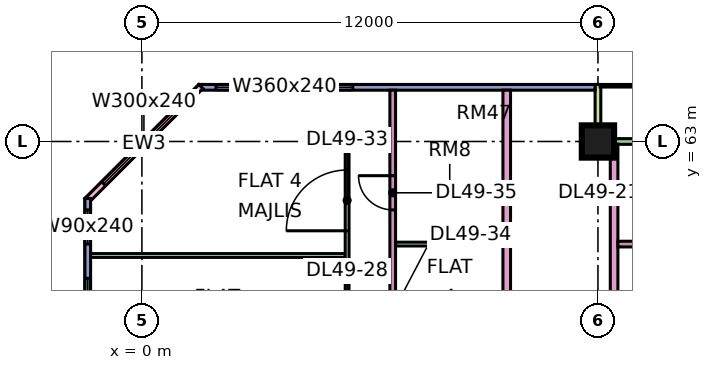
"""IFC4 building model, lengths in metres.
Left out: names, types, materials, properties, quantities, classifications, styles, units other than length and angle.
Written with IfcOpenShell. Run it as: python <this file> out.ifc"""

import sys

from ifc_helpers import new_model, si_unit, direction, frame, frame_2d, origin, origin_2d, place, context, subcontext, project, spatial, rectangle, extrude, element, fill, save


model = new_model("IFC4")
c1 = context("Model", 3, precision=1e-05, world=origin(), true_north=direction((0.0, 1.0)))
c2 = subcontext(c1, "Body", "Model", "MODEL_VIEW")
j1 = project(units=[si_unit("LENGTHUNIT", "METRE"), si_unit("PLANEANGLEUNIT", "RADIAN")], contexts=[c1])
p1 = place(None, origin())
s1 = spatial("IfcSite", under=j1, at=p1, CompositionType="ELEMENT")
p2 = place(p1, origin())
s2 = spatial("IfcBuilding", under=s1, at=p2, CompositionType="ELEMENT")
p3 = place(p2, frame((0.0, 0.0, 211.65)))
s3 = spatial("IfcBuildingStorey", under=s2, at=p3, CompositionType="ELEMENT", Elevation=211.65)
p4 = place(p3, frame((12.0, 63.0, 0.0), z_axis=(0.0, 0.0, 1.0), x_axis=(1.0, 0.0, 0.0)))
e1 = element("IfcColumn", 1, at=p4, inside=s3, PredefinedType="COLUMN", context=c2, shape_type="SweptSolid", body=[
    extrude(rectangle(XDim=0.85, YDim=0.85, at=origin_2d()), origin(), (0.0, 0.0, 1.0), 3.75),
])
p5 = place(p3, frame((22.425, 63.0, 0.0), z_axis=(0.0, 0.0, 1.0), x_axis=(-1.0, 0.0, 0.0)))
e2 = element("IfcWall", 2, at=p5, inside=s3, PredefinedType="SOLIDWALL", context=c2, shape_type="SweptSolid", body=[
    extrude(rectangle(XDim=10.35, YDim=0.15, at=frame_2d((5.175, 0.0))), origin(), (0.0, 0.0, 1.0), 3.35),
])
p6 = place(p5, frame((1.1, 0.0, 0.0)))
e3 = element("IfcOpeningElement", 3, at=p6, cuts=e2, PredefinedType="OPENING", context=c2, shape_type="SweptSolid", body=[
    extrude(rectangle(XDim=1.8, YDim=2.4, at=frame_2d((0.9, 1.2))), frame((0.0, 0.085, 0.0), z_axis=(0.0, -1.0, 0.0), x_axis=(1.0, 0.0, 0.0)), (0.0, 0.0, 1.0), 0.17),
])
p7 = place(p5, frame((6.05, 0.0, 0.45)))
e4 = element("IfcOpeningElement", 4, at=p7, cuts=e2, PredefinedType="OPENING", context=c2, shape_type="SweptSolid", body=[
    extrude(rectangle(XDim=3.0, YDim=2.4, at=frame_2d((1.5, 1.2))), frame((0.0, 0.085, 0.0), z_axis=(0.0, -1.0, 0.0), x_axis=(1.0, 0.0, 0.0)), (0.0, 0.0, 1.0), 0.17),
])
p8 = place(p3, frame((12.0, 64.5, 0.0), z_axis=(0.0, 0.0, 1.0), x_axis=(0.0, -1.0, 0.0)))
e5 = element("IfcWall", 5, at=p8, inside=s3, PredefinedType="SOLIDWALL", context=c2, shape_type="SweptSolid", body=[
    extrude(rectangle(XDim=1.5, YDim=0.15, at=frame_2d((0.75, 0.0))), origin(), (0.0, 0.0, 1.0), 3.35),
])
p9 = place(p3, frame((11.925, 64.425, 0.0), z_axis=(0.0, 0.0, 1.0), x_axis=(-1.0, 0.0, 0.0)))
e6 = element("IfcWall", 6, at=p9, inside=s3, PredefinedType="SOLIDWALL", context=c2, shape_type="SweptSolid", body=[
    extrude(rectangle(XDim=10.425, YDim=0.15, at=frame_2d((5.212, 0.0))), origin(), (0.0, 0.0, 1.0), 3.35),
])
p10 = place(p9, frame((6.375, 0.0, 0.45)))
e7 = element("IfcOpeningElement", 7, at=p10, cuts=e6, PredefinedType="OPENING", context=c2, shape_type="SweptSolid", body=[
    extrude(rectangle(XDim=3.6, YDim=2.4, at=frame_2d((1.8, 1.2))), frame((0.0, 0.085, 0.0), z_axis=(0.0, -1.0, 0.0), x_axis=(1.0, 0.0, 0.0)), (0.0, 0.0, 1.0), 0.17),
])
p11 = place(p3, frame((1.553, 64.447, 0.0), z_axis=(0.0, 0.0, 1.0), x_axis=(-0.707106781187, -0.707106781187, 0.0)))
e8 = element("IfcWall", 8, at=p11, inside=s3, PredefinedType="SOLIDWALL", context=c2, shape_type="SweptSolid", body=[
    extrude(rectangle(XDim=4.243, YDim=0.15, at=frame_2d((2.121, 0.0))), origin(), (0.0, 0.0, 1.0), 3.35),
])
p12 = place(p11, frame((0.621, 0.0, 0.45)))
e9 = element("IfcOpeningElement", 9, at=p12, cuts=e8, PredefinedType="OPENING", context=c2, shape_type="SweptSolid", body=[
    extrude(rectangle(XDim=3.0, YDim=2.4, at=frame_2d((1.5, 1.2))), frame((0.0, 0.085, 0.0), z_axis=(0.0, -1.0, 0.0), x_axis=(1.0, 0.0, 0.0)), (0.0, 0.0, 1.0), 0.17),
])
p13 = place(p3, frame((-1.425, 61.5, 0.0), z_axis=(0.0, 0.0, 1.0), x_axis=(0.0, -1.0, 0.0)))
e10 = element("IfcWall", 10, at=p13, inside=s3, PredefinedType="SOLIDWALL", context=c2, shape_type="SweptSolid", body=[
    extrude(rectangle(XDim=13.425, YDim=0.15, at=frame_2d((6.712, 0.0))), origin(), (0.0, 0.0, 1.0), 3.35),
])
p14 = place(p13, frame((0.3, 0.0, 0.45)))
e11 = element("IfcOpeningElement", 11, at=p14, cuts=e10, PredefinedType="OPENING", context=c2, shape_type="SweptSolid", body=[
    extrude(rectangle(XDim=0.9, YDim=2.4, at=frame_2d((0.45, 1.2))), frame((0.0, 0.085, 0.0), z_axis=(0.0, -1.0, 0.0), x_axis=(1.0, 0.0, 0.0)), (0.0, 0.0, 1.0), 0.17),
])
p15 = place(p13, frame((2.1, 0.0, 0.45)))
e12 = element("IfcOpeningElement", 12, at=p15, cuts=e10, PredefinedType="OPENING", context=c2, shape_type="SweptSolid", body=[
    extrude(rectangle(XDim=1.8, YDim=2.4, at=frame_2d((0.9, 1.2))), frame((0.0, 0.085, 0.0), z_axis=(0.0, -1.0, 0.0), x_axis=(1.0, 0.0, 0.0)), (0.0, 0.0, 1.0), 0.17),
])
p16 = place(p13, frame((5.1, 0.0, 0.45)))
e13 = element("IfcOpeningElement", 13, at=p16, cuts=e10, PredefinedType="OPENING", context=c2, shape_type="SweptSolid", body=[
    extrude(rectangle(XDim=1.8, YDim=2.4, at=frame_2d((0.9, 1.2))), frame((0.0, 0.085, 0.0), z_axis=(0.0, -1.0, 0.0), x_axis=(1.0, 0.0, 0.0)), (0.0, 0.0, 1.0), 0.17),
])
p17 = place(p13, frame((8.1, 0.0, 0.45)))
e14 = element("IfcOpeningElement", 14, at=p17, cuts=e10, PredefinedType="OPENING", context=c2, shape_type="SweptSolid", body=[
    extrude(rectangle(XDim=1.8, YDim=2.4, at=frame_2d((0.9, 1.2))), frame((0.0, 0.085, 0.0), z_axis=(0.0, -1.0, 0.0), x_axis=(1.0, 0.0, 0.0)), (0.0, 0.0, 1.0), 0.17),
])
p18 = place(p13, frame((11.062, 0.0, 0.45)))
e15 = element("IfcOpeningElement", 15, at=p18, cuts=e10, PredefinedType="OPENING", context=c2, shape_type="SweptSolid", body=[
    extrude(rectangle(XDim=1.8, YDim=2.4, at=frame_2d((0.9, 1.2))), frame((0.0, 0.085, 0.0), z_axis=(0.0, -1.0, 0.0), x_axis=(1.0, 0.0, 0.0)), (0.0, 0.0, 1.0), 0.17),
])
p19 = place(p3, frame((-1.351, 60.0, 0.0), z_axis=(0.0, 0.0, 1.0), x_axis=(1.0, 0.0, 0.0)))
e16 = element("IfcWall", 16, at=p19, inside=s3, PredefinedType="PARTITIONING", context=c2, shape_type="SweptSolid", body=[
    extrude(rectangle(XDim=6.701, YDim=0.1, at=frame_2d((3.351, 0.0))), origin(), (0.0, 0.0, 1.0), 3.35),
])
p20 = place(p3, frame((5.4, 36.1, 0.0), z_axis=(0.0, 0.0, 1.0), x_axis=(0.0, 1.0, 0.0)))
e17 = element("IfcWall", 17, at=p20, inside=s3, PredefinedType="PARTITIONING", context=c2, shape_type="SweptSolid", body=[
    extrude(rectangle(XDim=26.95, YDim=0.1, at=frame_2d((13.475, 0.0))), origin(), (0.0, 0.0, 1.0), 3.35),
])
p21 = place(p20, frame((0.95, 0.0, 0.0)))
e18 = element("IfcOpeningElement", 18, at=p21, cuts=e17, PredefinedType="OPENING", context=c2, shape_type="SweptSolid", body=[
    extrude(rectangle(XDim=0.9, YDim=2.1, at=frame_2d((0.45, 1.05))), frame((0.0, 0.06, 0.0), z_axis=(0.0, -1.0, 0.0), x_axis=(1.0, 0.0, 0.0)), (0.0, 0.0, 1.0), 0.12),
])
p22 = place(p20, frame((3.95, 0.0, 0.0)))
e19 = element("IfcOpeningElement", 19, at=p22, cuts=e17, PredefinedType="OPENING", context=c2, shape_type="SweptSolid", body=[
    extrude(rectangle(XDim=0.9, YDim=2.1, at=frame_2d((0.45, 1.05))), frame((0.0, 0.06, 0.0), z_axis=(0.0, -1.0, 0.0), x_axis=(1.0, 0.0, 0.0)), (0.0, 0.0, 1.0), 0.12),
])
p23 = place(p20, frame((15.95, 0.0, 0.0)))
e20 = element("IfcOpeningElement", 20, at=p23, cuts=e17, PredefinedType="OPENING", context=c2, shape_type="SweptSolid", body=[
    extrude(rectangle(XDim=0.9, YDim=2.1, at=frame_2d((0.45, 1.05))), frame((0.0, 0.06, 0.0), z_axis=(0.0, -1.0, 0.0), x_axis=(1.0, 0.0, 0.0)), (0.0, 0.0, 1.0), 0.12),
])
p24 = place(p20, frame((18.95, 0.0, 0.0)))
e21 = element("IfcOpeningElement", 21, at=p24, cuts=e17, PredefinedType="OPENING", context=c2, shape_type="SweptSolid", body=[
    extrude(rectangle(XDim=0.9, YDim=2.1, at=frame_2d((0.45, 1.05))), frame((0.0, 0.06, 0.0), z_axis=(0.0, -1.0, 0.0), x_axis=(1.0, 0.0, 0.0)), (0.0, 0.0, 1.0), 0.12),
])
p25 = place(p20, frame((21.95, 0.0, 0.0)))
e22 = element("IfcOpeningElement", 22, at=p25, cuts=e17, PredefinedType="OPENING", context=c2, shape_type="SweptSolid", body=[
    extrude(rectangle(XDim=0.9, YDim=2.1, at=frame_2d((0.45, 1.05))), frame((0.0, 0.06, 0.0), z_axis=(0.0, -1.0, 0.0), x_axis=(1.0, 0.0, 0.0)), (0.0, 0.0, 1.0), 0.12),
])
p26 = place(p20, frame((9.95, 0.0, 0.0)))
e23 = element("IfcOpeningElement", 23, at=p26, cuts=e17, PredefinedType="OPENING", context=c2, shape_type="SweptSolid", body=[
    extrude(rectangle(XDim=0.9, YDim=2.1, at=frame_2d((0.45, 1.05))), frame((0.0, 0.06, 0.0), z_axis=(0.0, -1.0, 0.0), x_axis=(1.0, 0.0, 0.0)), (0.0, 0.0, 1.0), 0.12),
])
p27 = place(p20, frame((24.55, 0.0, 0.0)))
e24 = element("IfcOpeningElement", 24, at=p27, cuts=e17, PredefinedType="OPENING", context=c2, shape_type="SweptSolid", body=[
    extrude(rectangle(XDim=1.6, YDim=2.1, at=frame_2d((0.8, 1.05))), frame((0.0, 0.06, 0.0), z_axis=(0.0, -1.0, 0.0), x_axis=(1.0, 0.0, 0.0)), (0.0, 0.0, 1.0), 0.12),
])
p28 = place(p3, frame((5.45, 63.0, 0.0), z_axis=(0.0, 0.0, 1.0), x_axis=(1.0, 0.0, 0.0)))
e25 = element("IfcWall", 25, at=p28, inside=s3, PredefinedType="PARTITIONING", context=c2, shape_type="SweptSolid", body=[
    extrude(rectangle(XDim=0.55, YDim=0.1, at=frame_2d((0.275, 0.0))), origin(), (0.0, 0.0, 1.0), 3.35),
])
p29 = place(p3, frame((6.6, 39.525, 0.0), z_axis=(0.0, 0.0, 1.0), x_axis=(0.0, 1.0, 0.0)))
e26 = element("IfcWall", 26, at=p29, inside=s3, PredefinedType="PARTITIONING", context=c2, shape_type="SweptSolid", body=[
    extrude(rectangle(XDim=24.825, YDim=0.15, at=frame_2d((12.413, 0.0))), origin(), (0.0, 0.0, 1.0), 3.35),
])
p30 = place(p29, frame((3.225, 0.0, 0.0)))
e27 = element("IfcOpeningElement", 27, at=p30, cuts=e26, PredefinedType="OPENING", context=c2, shape_type="SweptSolid", body=[
    extrude(rectangle(XDim=0.8, YDim=2.1, at=frame_2d((0.4, 1.05))), frame((0.0, 0.085, 0.0), z_axis=(0.0, -1.0, 0.0), x_axis=(1.0, 0.0, 0.0)), (0.0, 0.0, 1.0), 0.17),
])
p31 = place(p29, frame((13.875, 0.0, 0.0)))
e28 = element("IfcOpeningElement", 28, at=p31, cuts=e26, PredefinedType="OPENING", context=c2, shape_type="SweptSolid", body=[
    extrude(rectangle(XDim=0.9, YDim=2.1, at=frame_2d((0.45, 1.05))), frame((0.0, 0.085, 0.0), z_axis=(0.0, -1.0, 0.0), x_axis=(1.0, 0.0, 0.0)), (0.0, 0.0, 1.0), 0.17),
])
p32 = place(p29, frame((6.225, 0.0, 0.0)))
e29 = element("IfcOpeningElement", 29, at=p32, cuts=e26, PredefinedType="OPENING", context=c2, shape_type="SweptSolid", body=[
    extrude(rectangle(XDim=0.8, YDim=2.1, at=frame_2d((0.4, 1.05))), frame((0.0, 0.085, 0.0), z_axis=(0.0, -1.0, 0.0), x_axis=(1.0, 0.0, 0.0)), (0.0, 0.0, 1.0), 0.17),
])
p33 = place(p29, frame((18.525, 0.0, 0.0)))
e30 = element("IfcOpeningElement", 30, at=p33, cuts=e26, PredefinedType="OPENING", context=c2, shape_type="SweptSolid", body=[
    extrude(rectangle(XDim=0.9, YDim=2.1, at=frame_2d((0.45, 1.05))), frame((0.0, 0.085, 0.0), z_axis=(0.0, -1.0, 0.0), x_axis=(1.0, 0.0, 0.0)), (0.0, 0.0, 1.0), 0.17),
])
p34 = place(p29, frame((21.675, 0.0, 0.0)))
e31 = element("IfcOpeningElement", 31, at=p34, cuts=e26, PredefinedType="OPENING", context=c2, shape_type="SweptSolid", body=[
    extrude(rectangle(XDim=0.9, YDim=2.1, at=frame_2d((0.45, 1.05))), frame((0.0, 0.085, 0.0), z_axis=(0.0, -1.0, 0.0), x_axis=(1.0, 0.0, 0.0)), (0.0, 0.0, 1.0), 0.17),
])
p35 = place(p29, frame((9.375, 0.0, 0.0)))
e32 = element("IfcOpeningElement", 32, at=p35, cuts=e26, PredefinedType="OPENING", context=c2, shape_type="SweptSolid", body=[
    extrude(rectangle(XDim=0.8, YDim=2.1, at=frame_2d((0.4, 1.05))), frame((0.0, 0.085, 0.0), z_axis=(0.0, -1.0, 0.0), x_axis=(1.0, 0.0, 0.0)), (0.0, 0.0, 1.0), 0.17),
])
p36 = place(p3, frame((6.675, 60.3, 0.0), z_axis=(0.0, 0.0, 1.0), x_axis=(1.0, 0.0, 0.0)))
e33 = element("IfcWall", 33, at=p36, inside=s3, PredefinedType="PARTITIONING", context=c2, shape_type="SweptSolid", body=[
    extrude(rectangle(XDim=2.825, YDim=0.1, at=frame_2d((1.413, 0.0))), origin(), (0.0, 0.0, 1.0), 3.35),
])
p37 = place(p3, frame((9.6, 20.0, 0.0), z_axis=(0.0, 0.0, 1.0), x_axis=(0.0, 1.0, 0.0)))
e34 = element("IfcWall", 34, at=p37, inside=s3, PredefinedType="PARTITIONING", context=c2, shape_type="SweptSolid", body=[
    extrude(rectangle(XDim=44.35, YDim=0.2, at=frame_2d((22.175, 0.0))), origin(), (0.0, 0.0, 1.0), 3.35),
])
p38 = place(p37, frame((17.25, 0.0, 0.0)))
e35 = element("IfcOpeningElement", 35, at=p38, cuts=e34, PredefinedType="OPENING", context=c2, shape_type="SweptSolid", body=[
    extrude(rectangle(XDim=1.0, YDim=2.1, at=frame_2d((0.5, 1.05))), frame((0.0, 0.11, 0.0), z_axis=(0.0, -1.0, 0.0), x_axis=(1.0, 0.0, 0.0)), (0.0, 0.0, 1.0), 0.22),
])
p39 = place(p37, frame((0.6, 0.0, 0.0)))
e36 = element("IfcOpeningElement", 36, at=p39, cuts=e34, PredefinedType="OPENING", context=c2, shape_type="SweptSolid", body=[
    extrude(rectangle(XDim=1.2, YDim=2.1, at=frame_2d((0.6, 1.05))), frame((0.0, 0.11, 0.0), z_axis=(0.0, -1.0, 0.0), x_axis=(1.0, 0.0, 0.0)), (0.0, 0.0, 1.0), 0.22),
])
p40 = place(p37, frame((4.35, 0.0, 0.0)))
e37 = element("IfcOpeningElement", 37, at=p40, cuts=e34, PredefinedType="OPENING", context=c2, shape_type="SweptSolid", body=[
    extrude(rectangle(XDim=1.0, YDim=2.1, at=frame_2d((0.5, 1.05))), frame((0.0, 0.11, 0.0), z_axis=(0.0, -1.0, 0.0), x_axis=(1.0, 0.0, 0.0)), (0.0, 0.0, 1.0), 0.22),
])
p41 = place(p3, frame((12.425, 20.0, 0.0), z_axis=(0.0, 0.0, 1.0), x_axis=(0.0, 1.0, 0.0)))
e38 = element("IfcWall", 38, at=p41, inside=s3, PredefinedType="PARTITIONING", context=c2, shape_type="SweptSolid", body=[
    extrude(rectangle(XDim=42.926, YDim=0.2, at=frame_2d((21.463, 0.0))), origin(), (0.0, 0.0, 1.0), 3.35),
])
p42 = place(p41, frame((7.0, 0.0, 0.0)))
e39 = element("IfcOpeningElement", 39, at=p42, cuts=e38, PredefinedType="OPENING", context=c2, shape_type="SweptSolid", body=[
    extrude(rectangle(XDim=1.0, YDim=2.1, at=frame_2d((0.5, 1.05))), frame((0.0, 0.11, 0.0), z_axis=(0.0, -1.0, 0.0), x_axis=(1.0, 0.0, 0.0)), (0.0, 0.0, 1.0), 0.22),
])
p43 = place(p41, frame((12.95, 0.0, 0.0)))
e40 = element("IfcOpeningElement", 40, at=p43, cuts=e38, PredefinedType="OPENING", context=c2, shape_type="SweptSolid", body=[
    extrude(rectangle(XDim=1.0, YDim=2.1, at=frame_2d((0.5, 1.05))), frame((0.0, 0.11, 0.0), z_axis=(0.0, -1.0, 0.0), x_axis=(1.0, 0.0, 0.0)), (0.0, 0.0, 1.0), 0.22),
])
p44 = place(p41, frame((23.35, 0.0, 0.0)))
e41 = element("IfcOpeningElement", 41, at=p44, cuts=e38, PredefinedType="OPENING", context=c2, shape_type="SweptSolid", body=[
    extrude(rectangle(XDim=1.0, YDim=2.1, at=frame_2d((0.5, 1.05))), frame((0.0, 0.11, 0.0), z_axis=(0.0, -1.0, 0.0), x_axis=(1.0, 0.0, 0.0)), (0.0, 0.0, 1.0), 0.22),
])
p45 = place(p41, frame((35.2, 0.0, 0.0)))
e42 = element("IfcOpeningElement", 42, at=p45, cuts=e38, PredefinedType="OPENING", context=c2, shape_type="SweptSolid", body=[
    extrude(rectangle(XDim=1.0, YDim=2.1, at=frame_2d((0.5, 1.05))), frame((0.0, 0.11, 0.0), z_axis=(0.0, -1.0, 0.0), x_axis=(1.0, 0.0, 0.0)), (0.0, 0.0, 1.0), 0.22),
])
p46 = place(p41, frame((1.15, 0.0, 0.0)))
e43 = element("IfcOpeningElement", 43, at=p46, cuts=e38, PredefinedType="OPENING", context=c2, shape_type="SweptSolid", body=[
    extrude(rectangle(XDim=1.8, YDim=2.1, at=frame_2d((0.9, 1.05))), frame((0.0, 0.11, 0.0), z_axis=(0.0, -1.0, 0.0), x_axis=(1.0, 0.0, 0.0)), (0.0, 0.0, 1.0), 0.22),
])
p47 = place(p41, frame((28.6, 0.0, 0.0)))
e44 = element("IfcOpeningElement", 44, at=p47, cuts=e38, PredefinedType="OPENING", context=c2, shape_type="SweptSolid", body=[
    extrude(rectangle(XDim=1.8, YDim=2.1, at=frame_2d((0.9, 1.05))), frame((0.0, 0.11, 0.0), z_axis=(0.0, -1.0, 0.0), x_axis=(1.0, 0.0, 0.0)), (0.0, 0.0, 1.0), 0.22),
])
p48 = place(p3, frame((12.525, 60.3, 0.0), z_axis=(0.0, 0.0, 1.0), x_axis=(1.0, 0.0, 0.0)))
e45 = element("IfcWall", 45, at=p48, inside=s3, PredefinedType="PARTITIONING", context=c2, shape_type="SweptSolid", body=[
    extrude(rectangle(XDim=4.625, YDim=0.15, at=frame_2d((2.312, 0.0))), origin(), (0.0, 0.0, 1.0), 3.35),
])
p49 = place(p10, origin())
e46 = element("IfcWindow", 46, at=p49, inside=s3, PartitioningType="SINGLE_PANEL", PredefinedType="WINDOW", context=c2, shape_type="SweptSolid", body=[
    extrude(rectangle(XDim=3.6, YDim=2.4, at=frame_2d((1.8, 1.2))), frame((0.0, 0.03, 0.0), z_axis=(0.0, -1.0, 0.0), x_axis=(1.0, 0.0, 0.0)), (0.0, 0.0, 1.0), 0.06),
])
fill(e7, e46)
p50 = place(p12, origin())
e47 = element("IfcWindow", 47, at=p50, inside=s3, PartitioningType="SINGLE_PANEL", PredefinedType="WINDOW", context=c2, shape_type="SweptSolid", body=[
    extrude(rectangle(XDim=3.0, YDim=2.4, at=frame_2d((1.5, 1.2))), frame((0.0, 0.03, 0.0), z_axis=(0.0, -1.0, 0.0), x_axis=(1.0, 0.0, 0.0)), (0.0, 0.0, 1.0), 0.06),
])
fill(e9, e47)
p51 = place(p14, origin())
e48 = element("IfcWindow", 48, at=p51, inside=s3, PartitioningType="SINGLE_PANEL", PredefinedType="WINDOW", context=c2, shape_type="SweptSolid", body=[
    extrude(rectangle(XDim=0.9, YDim=2.4, at=frame_2d((0.45, 1.2))), frame((0.0, 0.03, 0.0), z_axis=(0.0, -1.0, 0.0), x_axis=(1.0, 0.0, 0.0)), (0.0, 0.0, 1.0), 0.06),
])
fill(e11, e48)
p52 = place(p15, origin())
e49 = element("IfcWindow", 49, at=p52, inside=s3, PartitioningType="SINGLE_PANEL", PredefinedType="WINDOW", context=c2, shape_type="SweptSolid", body=[
    extrude(rectangle(XDim=1.8, YDim=2.4, at=frame_2d((0.9, 1.2))), frame((0.0, 0.03, 0.0), z_axis=(0.0, -1.0, 0.0), x_axis=(1.0, 0.0, 0.0)), (0.0, 0.0, 1.0), 0.06),
])
fill(e12, e49)
p53 = place(p27, origin())
e50 = element("IfcDoor", 50, at=p53, inside=s3, OperationType="DOUBLE_DOOR_SINGLE_SWING", PredefinedType="DOOR", context=c2, shape_type="SweptSolid", body=[
    extrude(rectangle(XDim=1.6, YDim=2.1, at=frame_2d((0.8, 1.05))), frame((0.0, 0.025, 0.0), z_axis=(0.0, -1.0, 0.0), x_axis=(1.0, 0.0, 0.0)), (0.0, 0.0, 1.0), 0.05),
])
fill(e24, e50)
p54 = place(p34, frame((0.9, 0.0, 0.0), z_axis=(0.0, 0.0, 1.0), x_axis=(-1.0, 0.0, 0.0)))
e51 = element("IfcDoor", 51, at=p54, inside=s3, OperationType="SINGLE_SWING_RIGHT", PredefinedType="DOOR", context=c2, shape_type="SweptSolid", body=[
    extrude(rectangle(XDim=0.9, YDim=2.1, at=frame_2d((0.45, 1.05))), frame((0.0, 0.025, 0.0), z_axis=(0.0, -1.0, 0.0), x_axis=(1.0, 0.0, 0.0)), (0.0, 0.0, 1.0), 0.05),
])
fill(e31, e51)
save(model, sys.argv[1])
